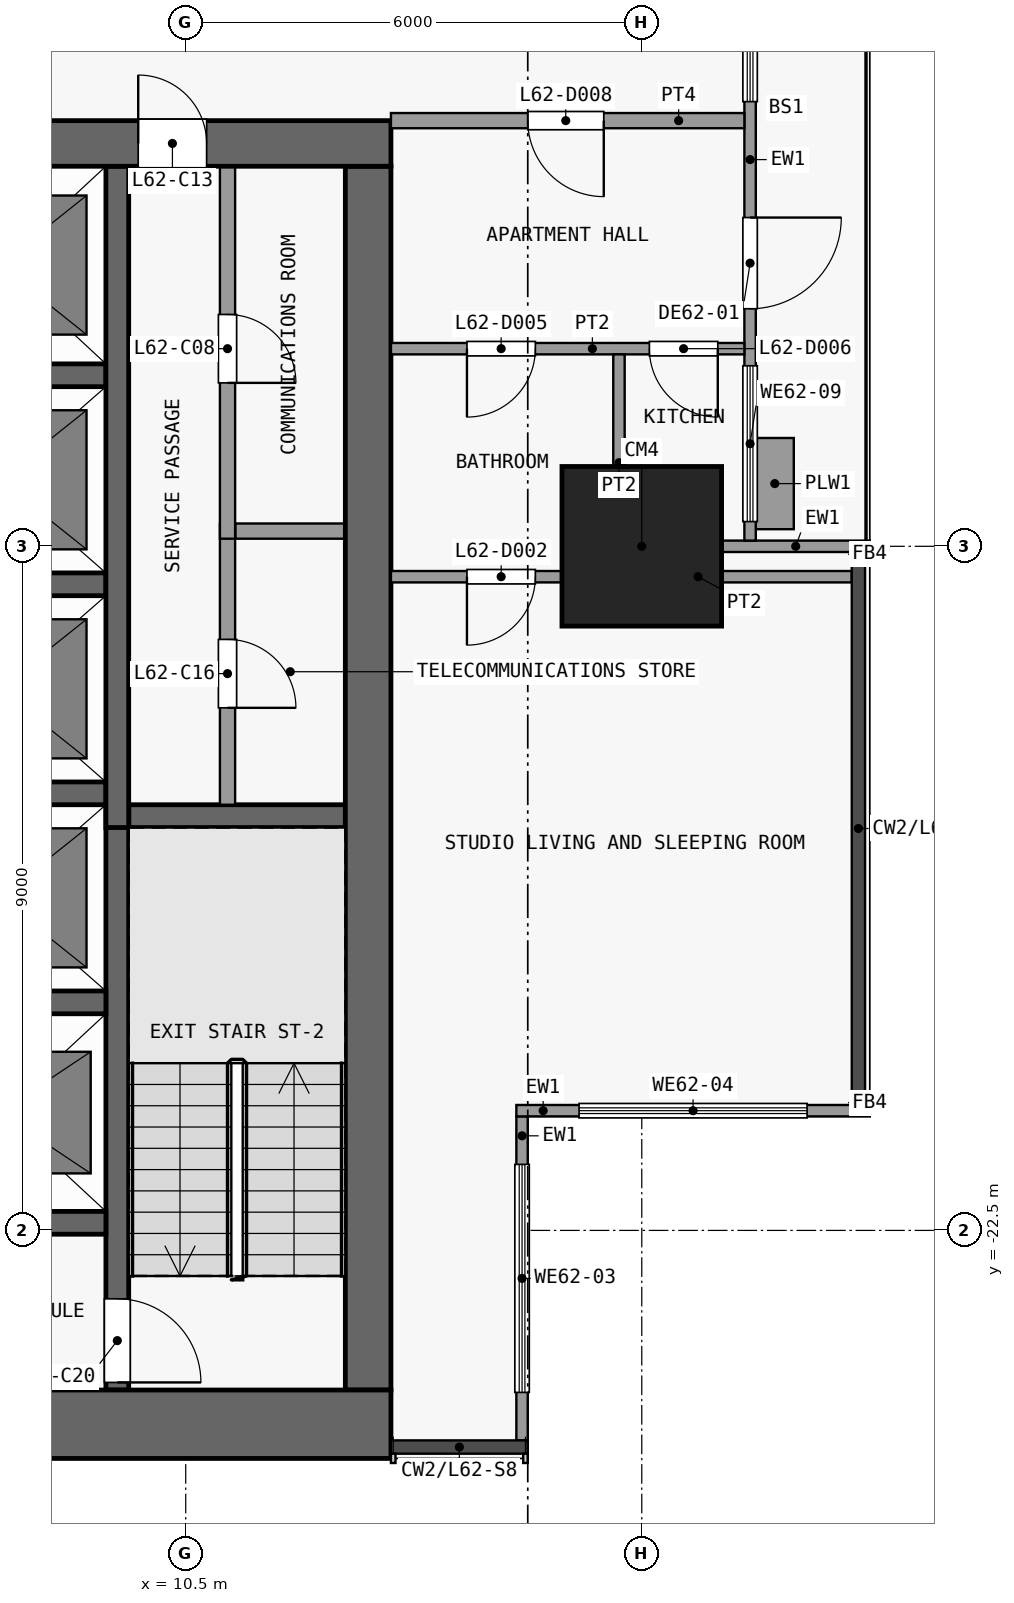
"""IFC4 building model, lengths in metres.
Left out: names, types, materials, properties, quantities, classifications, styles, units other than length and angle.
Written with IfcOpenShell. Run it as: python <this file> out.ifc"""

import sys

from ifc_helpers import new_model, si_unit, direction, frame, frame_2d, origin, origin_2d, place, context, subcontext, project, spatial, rectangle, extrude, element, fill, save


model = new_model("IFC4")
c1 = context("Model", 3, precision=1e-05, world=origin(), true_north=direction((0.0, 1.0)))
c2 = subcontext(c1, "Body", "Model", "MODEL_VIEW")
j1 = project(units=[si_unit("LENGTHUNIT", "METRE"), si_unit("PLANEANGLEUNIT", "RADIAN")], contexts=[c1])
p1 = place(None, origin())
s1 = spatial("IfcSite", under=j1, at=p1, CompositionType="ELEMENT")
p2 = place(p1, origin())
s2 = spatial("IfcBuilding", under=s1, at=p2, CompositionType="ELEMENT")
p3 = place(p2, frame((0.0, 0.0, 244.7)))
s3 = spatial("IfcBuildingStorey", under=s2, at=p3, CompositionType="ELEMENT", Elevation=244.7)
p4 = place(p3, frame((16.5, -13.5, 0.0), z_axis=(0.0, 0.0, 1.0), x_axis=(1.0, 0.0, 0.0)))
e1 = element("IfcColumn", 1, at=p4, inside=s3, PredefinedType="COLUMN", context=c2, shape_type="SweptSolid", body=[
    extrude(rectangle(XDim=2.1, YDim=2.1, at=origin_2d()), origin(), (0.0, 0.0, 1.0), 3.6),
])
p5 = place(p3, frame((-13.2, -25.05, 0.0), z_axis=(0.0, 0.0, 1.0), x_axis=(1.0, 0.0, 0.0)))
e2 = element("IfcWall", 2, at=p5, inside=s3, PredefinedType="SHEAR", context=c2, shape_type="SweptSolid", body=[
    extrude(rectangle(XDim=26.4, YDim=0.9, at=frame_2d((13.2, 0.0))), origin(), (0.0, 0.0, 1.0), 3.15),
])
p6 = place(p3, frame((-13.2, -8.2, 0.0), z_axis=(0.0, 0.0, 1.0), x_axis=(1.0, 0.0, 0.0)))
e3 = element("IfcWall", 3, at=p6, inside=s3, PredefinedType="SHEAR", context=c2, shape_type="SweptSolid", body=[
    extrude(rectangle(XDim=26.4, YDim=0.6, at=frame_2d((13.2, 0.0))), origin(), (0.0, 0.0, 1.0), 3.15),
])
p7 = place(p6, frame((7.5, 0.0, 0.0)))
e4 = element("IfcOpeningElement", 4, at=p7, cuts=e3, PredefinedType="OPENING", context=c2, shape_type="SweptSolid", body=[
    extrude(rectangle(XDim=1.8, YDim=2.1, at=frame_2d((0.9, 1.05))), frame((0.0, 0.31, 0.0), z_axis=(0.0, -1.0, 0.0), x_axis=(1.0, 0.0, 0.0)), (0.0, 0.0, 1.0), 0.62),
])
p8 = place(p6, frame((17.1, 0.0, 0.0)))
e5 = element("IfcOpeningElement", 5, at=p8, cuts=e3, PredefinedType="OPENING", context=c2, shape_type="SweptSolid", body=[
    extrude(rectangle(XDim=1.8, YDim=2.1, at=frame_2d((0.9, 1.05))), frame((0.0, 0.31, 0.0), z_axis=(0.0, -1.0, 0.0), x_axis=(1.0, 0.0, 0.0)), (0.0, 0.0, 1.0), 0.62),
])
p9 = place(p6, frame((2.425, 0.0, 0.0)))
e6 = element("IfcOpeningElement", 6, at=p9, cuts=e3, PredefinedType="OPENING", context=c2, shape_type="SweptSolid", body=[
    extrude(rectangle(XDim=0.9, YDim=2.1, at=frame_2d((0.45, 1.05))), frame((0.0, 0.31, 0.0), z_axis=(0.0, -1.0, 0.0), x_axis=(1.0, 0.0, 0.0)), (0.0, 0.0, 1.0), 0.62),
])
p10 = place(p6, frame((23.075, 0.0, 0.0)))
e7 = element("IfcOpeningElement", 7, at=p10, cuts=e3, PredefinedType="OPENING", context=c2, shape_type="SweptSolid", body=[
    extrude(rectangle(XDim=0.9, YDim=2.1, at=frame_2d((0.45, 1.05))), frame((0.0, 0.31, 0.0), z_axis=(0.0, -1.0, 0.0), x_axis=(1.0, 0.0, 0.0)), (0.0, 0.0, 1.0), 0.62),
])
p11 = place(p3, frame((12.9, -24.6, 0.0), z_axis=(0.0, 0.0, 1.0), x_axis=(0.0, 1.0, 0.0)))
e8 = element("IfcWall", 8, at=p11, inside=s3, PredefinedType="SHEAR", context=c2, shape_type="SweptSolid", body=[
    extrude(rectangle(XDim=16.1, YDim=0.6, at=frame_2d((8.05, 0.0))), origin(), (0.0, 0.0, 1.0), 3.15),
])
for number, where, z_axis, x_axis in (
    (9, (6.65, -22.4, 0.0), (0.0, 0.0, 1.0), (1.0, 0.0, 0.0)),
    (10, (6.65, -19.5, 0.0), (0.0, 0.0, 1.0), (1.0, 0.0, 0.0)),
):
    element("IfcWall", number, at=place(p3, frame(where, z_axis=z_axis, x_axis=x_axis)), inside=s3, PredefinedType="SHEAR", context=c2, shape_type="SweptSolid", body=[
        extrude(rectangle(XDim=2.8, YDim=0.3, at=frame_2d((1.4, 0.0))), origin(), (0.0, 0.0, 1.0), 3.15),
    ])
p12 = place(p3, frame((9.75, -17.05, 0.0), z_axis=(0.0, 0.0, 1.0), x_axis=(1.0, 0.0, 0.0)))
e11 = element("IfcWall", 11, at=p12, inside=s3, PredefinedType="SHEAR", context=c2, shape_type="SweptSolid", body=[
    extrude(rectangle(XDim=2.85, YDim=0.3, at=frame_2d((1.425, 0.0))), origin(), (0.0, 0.0, 1.0), 3.15),
])
for number, where, z_axis, x_axis in (
    (12, (6.65, -16.75, 0.0), (0.0, 0.0, 1.0), (1.0, 0.0, 0.0)),
    (13, (6.65, -14.0, 0.0), (0.0, 0.0, 1.0), (1.0, 0.0, 0.0)),
):
    element("IfcWall", number, at=place(p3, frame(where, z_axis=z_axis, x_axis=x_axis)), inside=s3, PredefinedType="SHEAR", context=c2, shape_type="SweptSolid", body=[
        extrude(rectangle(XDim=2.8, YDim=0.3, at=frame_2d((1.4, 0.0))), origin(), (0.0, 0.0, 1.0), 3.15),
    ])
p13 = place(p3, frame((11.15, -13.3, 0.0), z_axis=(0.0, 0.0, 1.0), x_axis=(1.0, 0.0, 0.0)))
e14 = element("IfcWall", 14, at=p13, inside=s3, PredefinedType="PARTITIONING", context=c2, shape_type="SweptSolid", body=[
    extrude(rectangle(XDim=1.45, YDim=0.2, at=frame_2d((0.725, 0.0))), origin(), (0.0, 0.0, 1.0), 3.15),
])
p14 = place(p3, frame((6.65, -11.25, 0.0), z_axis=(0.0, 0.0, 1.0), x_axis=(1.0, 0.0, 0.0)))
e15 = element("IfcWall", 15, at=p14, inside=s3, PredefinedType="SHEAR", context=c2, shape_type="SweptSolid", body=[
    extrude(rectangle(XDim=2.8, YDim=0.3, at=frame_2d((1.4, 0.0))), origin(), (0.0, 0.0, 1.0), 3.15),
])
p15 = place(p3, frame((9.6, -16.9, 0.0), z_axis=(0.0, 0.0, 1.0), x_axis=(0.0, -1.0, 0.0)))
e16 = element("IfcWall", 16, at=p15, inside=s3, PredefinedType="SHEAR", context=c2, shape_type="SweptSolid", body=[
    extrude(rectangle(XDim=7.7, YDim=0.3, at=frame_2d((3.85, 0.0))), origin(), (0.0, 0.0, 1.0), 3.15),
])
p16 = place(p15, frame((6.5, 0.0, 0.0)))
e17 = element("IfcOpeningElement", 17, at=p16, cuts=e16, PredefinedType="OPENING", context=c2, shape_type="SweptSolid", body=[
    extrude(rectangle(XDim=1.1, YDim=2.1, at=frame_2d((0.55, 1.05))), frame((0.0, 0.16, 0.0), z_axis=(0.0, -1.0, 0.0), x_axis=(1.0, 0.0, 0.0)), (0.0, 0.0, 1.0), 0.32),
])
p17 = place(p3, frame((9.6, -17.2, 0.0), z_axis=(0.0, 0.0, 1.0), x_axis=(0.0, 1.0, 0.0)))
e18 = element("IfcWall", 18, at=p17, inside=s3, PredefinedType="SHEAR", context=c2, shape_type="SweptSolid", body=[
    extrude(rectangle(XDim=8.7, YDim=0.3, at=frame_2d((4.35, 0.0))), origin(), (0.0, 0.0, 1.0), 3.15),
])
p18 = place(p3, frame((11.05, -13.2, 0.0), z_axis=(0.0, 0.0, 1.0), x_axis=(0.0, -1.0, 0.0)))
e19 = element("IfcWall", 19, at=p18, inside=s3, PredefinedType="PARTITIONING", context=c2, shape_type="SweptSolid", body=[
    extrude(rectangle(XDim=3.7, YDim=0.2, at=frame_2d((1.85, 0.0))), origin(), (0.0, 0.0, 1.0), 3.15),
])
p19 = place(p18, frame((1.525, 0.0, 0.0)))
e20 = element("IfcOpeningElement", 20, at=p19, cuts=e19, PredefinedType="OPENING", context=c2, shape_type="SweptSolid", body=[
    extrude(rectangle(XDim=0.9, YDim=2.1, at=frame_2d((0.45, 1.05))), frame((0.0, 0.11, 0.0), z_axis=(0.0, -1.0, 0.0), x_axis=(1.0, 0.0, 0.0)), (0.0, 0.0, 1.0), 0.22),
])
p20 = place(p3, frame((11.05, -8.5, 0.0), z_axis=(0.0, 0.0, 1.0), x_axis=(0.0, -1.0, 0.0)))
e21 = element("IfcWall", 21, at=p20, inside=s3, PredefinedType="PARTITIONING", context=c2, shape_type="SweptSolid", body=[
    extrude(rectangle(XDim=4.9, YDim=0.2, at=frame_2d((2.45, 0.0))), origin(), (0.0, 0.0, 1.0), 3.15),
])
p21 = place(p20, frame((1.95, 0.0, 0.0)))
e22 = element("IfcOpeningElement", 22, at=p21, cuts=e21, PredefinedType="OPENING", context=c2, shape_type="SweptSolid", body=[
    extrude(rectangle(XDim=0.9, YDim=2.1, at=frame_2d((0.45, 1.05))), frame((0.0, 0.11, 0.0), z_axis=(0.0, -1.0, 0.0), x_axis=(1.0, 0.0, 0.0)), (0.0, 0.0, 1.0), 0.22),
])
p22 = place(p3, frame((14.925, -21.0, 0.0), z_axis=(0.0, 0.0, 1.0), x_axis=(0.0, -1.0, 0.0)))
e23 = element("IfcWall", 23, at=p22, inside=s3, PredefinedType="SOLIDWALL", context=c2, shape_type="SweptSolid", body=[
    extrude(rectangle(XDim=4.262, YDim=0.15, at=frame_2d((2.131, 0.0))), origin(), (0.0, 0.0, 1.0), 3.15),
])
p23 = place(p22, frame((0.631, 0.0, 0.9)))
e24 = element("IfcOpeningElement", 24, at=p23, cuts=e23, PredefinedType="OPENING", context=c2, shape_type="SweptSolid", body=[
    extrude(rectangle(XDim=3.0, YDim=2.4, at=frame_2d((1.5, 1.2))), frame((0.0, 0.085, 0.0), z_axis=(0.0, -1.0, 0.0), x_axis=(1.0, 0.0, 0.0)), (0.0, 0.0, 1.0), 0.17),
])
p24 = place(p3, frame((19.5, -20.925, 0.0), z_axis=(0.0, 0.0, 1.0), x_axis=(-1.0, 0.0, 0.0)))
e25 = element("IfcWall", 25, at=p24, inside=s3, PredefinedType="SOLIDWALL", context=c2, shape_type="SweptSolid", body=[
    extrude(rectangle(XDim=4.65, YDim=0.15, at=frame_2d((2.325, 0.0))), origin(), (0.0, 0.0, 1.0), 3.15),
])
p25 = place(p24, frame((0.825, 0.0, 0.9)))
e26 = element("IfcOpeningElement", 26, at=p25, cuts=e25, PredefinedType="OPENING", context=c2, shape_type="SweptSolid", body=[
    extrude(rectangle(XDim=3.0, YDim=2.4, at=frame_2d((1.5, 1.2))), frame((0.0, 0.085, 0.0), z_axis=(0.0, -1.0, 0.0), x_axis=(1.0, 0.0, 0.0)), (0.0, 0.0, 1.0), 0.17),
])
p26 = place(p3, frame((17.55, -13.5, 0.0), z_axis=(0.0, 0.0, 1.0), x_axis=(1.0, 0.0, 0.0)))
e27 = element("IfcWall", 27, at=p26, inside=s3, PredefinedType="SOLIDWALL", context=c2, shape_type="SweptSolid", body=[
    extrude(rectangle(XDim=1.95, YDim=0.15, at=frame_2d((0.975, 0.0))), origin(), (0.0, 0.0, 1.0), 3.15),
])
p27 = place(p3, frame((17.925, -4.575, 0.0), z_axis=(0.0, 0.0, 1.0), x_axis=(0.0, -1.0, 0.0)))
e28 = element("IfcWall", 28, at=p27, inside=s3, PredefinedType="SOLIDWALL", context=c2, shape_type="SweptSolid", body=[
    extrude(rectangle(XDim=8.85, YDim=0.15, at=frame_2d((4.425, 0.0))), origin(), (0.0, 0.0, 1.0), 3.15),
])
p28 = place(p27, frame((4.6, 0.0, 0.0)))
e29 = element("IfcOpeningElement", 29, at=p28, cuts=e28, PredefinedType="OPENING", context=c2, shape_type="SweptSolid", body=[
    extrude(rectangle(XDim=1.2, YDim=2.4, at=frame_2d((0.6, 1.2))), frame((0.0, 0.085, 0.0), z_axis=(0.0, -1.0, 0.0), x_axis=(1.0, 0.0, 0.0)), (0.0, 0.0, 1.0), 0.17),
])
p29 = place(p27, frame((6.55, 0.0, 0.9)))
e30 = element("IfcOpeningElement", 30, at=p29, cuts=e28, PredefinedType="OPENING", context=c2, shape_type="SweptSolid", body=[
    extrude(rectangle(XDim=2.05, YDim=2.1, at=frame_2d((1.025, 1.05))), frame((0.0, 0.085, 0.0), z_axis=(0.0, -1.0, 0.0), x_axis=(1.0, 0.0, 0.0)), (0.0, 0.0, 1.0), 0.17),
])
p30 = place(p27, frame((0.8, 0.0, 0.9)))
e31 = element("IfcOpeningElement", 31, at=p30, cuts=e28, PredefinedType="OPENING", context=c2, shape_type="SweptSolid", body=[
    extrude(rectangle(XDim=2.275, YDim=2.1, at=frame_2d((1.137, 1.05))), frame((0.0, 0.085, 0.0), z_axis=(0.0, -1.0, 0.0), x_axis=(1.0, 0.0, 0.0)), (0.0, 0.0, 1.0), 0.17),
])
p31 = place(p3, frame((18.25, -13.275, 0.0), z_axis=(0.0, 0.0, 1.0), x_axis=(0.0, 1.0, 0.0)))
e32 = element("IfcWall", 32, at=p31, inside=s3, PredefinedType="USERDEFINED", context=c2, shape_type="SweptSolid", body=[
    extrude(rectangle(XDim=1.2, YDim=0.5, at=frame_2d((0.6, 0.0))), origin(), (0.0, 0.0, 1.0), 0.9),
])
p32 = place(p3, frame((13.2, -13.9, 0.0), z_axis=(0.0, 0.0, 1.0), x_axis=(1.0, 0.0, 0.0)))
e33 = element("IfcWall", 33, at=p32, inside=s3, PredefinedType="PARTITIONING", context=c2, shape_type="SweptSolid", body=[
    extrude(rectangle(XDim=6.062, YDim=0.15, at=frame_2d((3.031, 0.0))), origin(), (0.0, 0.0, 1.0), 3.15),
])
p33 = place(p32, frame((1.0, 0.0, 0.0)))
e34 = element("IfcOpeningElement", 34, at=p33, cuts=e33, PredefinedType="OPENING", context=c2, shape_type="SweptSolid", body=[
    extrude(rectangle(XDim=0.9, YDim=2.1, at=frame_2d((0.45, 1.05))), frame((0.0, 0.085, 0.0), z_axis=(0.0, -1.0, 0.0), x_axis=(1.0, 0.0, 0.0)), (0.0, 0.0, 1.0), 0.17),
])
p34 = place(p3, frame((13.2, -10.9, 0.0), z_axis=(0.0, 0.0, 1.0), x_axis=(1.0, 0.0, 0.0)))
e35 = element("IfcWall", 35, at=p34, inside=s3, PredefinedType="PARTITIONING", context=c2, shape_type="SweptSolid", body=[
    extrude(rectangle(XDim=4.65, YDim=0.15, at=frame_2d((2.325, 0.0))), origin(), (0.0, 0.0, 1.0), 3.15),
])
p35 = place(p34, frame((1.0, 0.0, 0.0)))
e36 = element("IfcOpeningElement", 36, at=p35, cuts=e35, PredefinedType="OPENING", context=c2, shape_type="SweptSolid", body=[
    extrude(rectangle(XDim=0.9, YDim=2.1, at=frame_2d((0.45, 1.05))), frame((0.0, 0.085, 0.0), z_axis=(0.0, -1.0, 0.0), x_axis=(1.0, 0.0, 0.0)), (0.0, 0.0, 1.0), 0.17),
])
p36 = place(p34, frame((3.4, 0.0, 0.0)))
e37 = element("IfcOpeningElement", 37, at=p36, cuts=e35, PredefinedType="OPENING", context=c2, shape_type="SweptSolid", body=[
    extrude(rectangle(XDim=0.9, YDim=2.1, at=frame_2d((0.45, 1.05))), frame((0.0, 0.085, 0.0), z_axis=(0.0, -1.0, 0.0), x_axis=(1.0, 0.0, 0.0)), (0.0, 0.0, 1.0), 0.17),
])
p37 = place(p3, frame((13.2, -7.9, 0.0), z_axis=(0.0, 0.0, 1.0), x_axis=(1.0, 0.0, 0.0)))
e38 = element("IfcWall", 38, at=p37, inside=s3, PredefinedType="PARTITIONING", context=c2, shape_type="SweptSolid", body=[
    extrude(rectangle(XDim=4.65, YDim=0.2, at=frame_2d((2.325, 0.0))), origin(), (0.0, 0.0, 1.0), 3.15),
])
p38 = place(p37, frame((1.8, 0.0, 0.0)))
e39 = element("IfcOpeningElement", 39, at=p38, cuts=e38, PredefinedType="OPENING", context=c2, shape_type="SweptSolid", body=[
    extrude(rectangle(XDim=1.0, YDim=2.1, at=frame_2d((0.5, 1.05))), frame((0.0, 0.11, 0.0), z_axis=(0.0, -1.0, 0.0), x_axis=(1.0, 0.0, 0.0)), (0.0, 0.0, 1.0), 0.22),
])
p39 = place(p3, frame((16.2, -13.825, 0.0), z_axis=(0.0, 0.0, 1.0), x_axis=(0.0, 1.0, 0.0)))
e40 = element("IfcWall", 40, at=p39, inside=s3, PredefinedType="PARTITIONING", context=c2, shape_type="SweptSolid", body=[
    extrude(rectangle(XDim=2.85, YDim=0.15, at=frame_2d((1.425, 0.0))), origin(), (0.0, 0.0, 1.0), 3.15),
])
p40 = place(p21, origin())
e41 = element("IfcDoor", 41, at=p40, inside=s3, OperationType="SINGLE_SWING_RIGHT", PredefinedType="DOOR", context=c2, shape_type="SweptSolid", body=[
    extrude(rectangle(XDim=0.9, YDim=2.1, at=frame_2d((0.45, 1.05))), frame((0.0, 0.025, 0.0), z_axis=(0.0, -1.0, 0.0), x_axis=(1.0, 0.0, 0.0)), (0.0, 0.0, 1.0), 0.05),
])
fill(e22, e41)
p41 = place(p10, origin())
e42 = element("IfcDoor", 42, at=p41, inside=s3, OperationType="SINGLE_SWING_LEFT", PredefinedType="DOOR", context=c2, shape_type="SweptSolid", body=[
    extrude(rectangle(XDim=0.9, YDim=2.1, at=frame_2d((0.45, 1.05))), frame((0.0, 0.025, 0.0), z_axis=(0.0, -1.0, 0.0), x_axis=(1.0, 0.0, 0.0)), (0.0, 0.0, 1.0), 0.05),
])
fill(e7, e42)
p42 = place(p19, origin())
e43 = element("IfcDoor", 43, at=p42, inside=s3, OperationType="SINGLE_SWING_RIGHT", PredefinedType="DOOR", context=c2, shape_type="SweptSolid", body=[
    extrude(rectangle(XDim=0.9, YDim=2.1, at=frame_2d((0.45, 1.05))), frame((0.0, 0.025, 0.0), z_axis=(0.0, -1.0, 0.0), x_axis=(1.0, 0.0, 0.0)), (0.0, 0.0, 1.0), 0.05),
])
fill(e20, e43)
p43 = place(p16, origin())
e44 = element("IfcDoor", 44, at=p43, inside=s3, OperationType="SINGLE_SWING_RIGHT", PredefinedType="DOOR", context=c2, shape_type="SweptSolid", body=[
    extrude(rectangle(XDim=1.1, YDim=2.1, at=frame_2d((0.55, 1.05))), frame((0.0, 0.025, 0.0), z_axis=(0.0, -1.0, 0.0), x_axis=(1.0, 0.0, 0.0)), (0.0, 0.0, 1.0), 0.05),
])
fill(e17, e44)
p44 = place(p23, origin())
e45 = element("IfcWindow", 45, at=p44, inside=s3, PartitioningType="SINGLE_PANEL", PredefinedType="WINDOW", context=c2, shape_type="SweptSolid", body=[
    extrude(rectangle(XDim=3.0, YDim=2.4, at=frame_2d((1.5, 1.2))), frame((0.0, 0.03, 0.0), z_axis=(0.0, -1.0, 0.0), x_axis=(1.0, 0.0, 0.0)), (0.0, 0.0, 1.0), 0.06),
])
fill(e24, e45)
p45 = place(p25, origin())
e46 = element("IfcWindow", 46, at=p45, inside=s3, PartitioningType="SINGLE_PANEL", PredefinedType="WINDOW", context=c2, shape_type="SweptSolid", body=[
    extrude(rectangle(XDim=3.0, YDim=2.4, at=frame_2d((1.5, 1.2))), frame((0.0, 0.03, 0.0), z_axis=(0.0, -1.0, 0.0), x_axis=(1.0, 0.0, 0.0)), (0.0, 0.0, 1.0), 0.06),
])
fill(e26, e46)
p46 = place(p28, origin())
e47 = element("IfcDoor", 47, at=p46, inside=s3, OperationType="SINGLE_SWING_LEFT", PredefinedType="DOOR", context=c2, shape_type="SweptSolid", body=[
    extrude(rectangle(XDim=1.2, YDim=2.4, at=frame_2d((0.6, 1.2))), frame((0.0, 0.025, 0.0), z_axis=(0.0, -1.0, 0.0), x_axis=(1.0, 0.0, 0.0)), (0.0, 0.0, 1.0), 0.05),
])
fill(e29, e47)
p47 = place(p29, origin())
e48 = element("IfcWindow", 48, at=p47, inside=s3, PartitioningType="SINGLE_PANEL", PredefinedType="WINDOW", context=c2, shape_type="SweptSolid", body=[
    extrude(rectangle(XDim=2.05, YDim=2.1, at=frame_2d((1.025, 1.05))), frame((0.0, 0.03, 0.0), z_axis=(0.0, -1.0, 0.0), x_axis=(1.0, 0.0, 0.0)), (0.0, 0.0, 1.0), 0.06),
])
fill(e30, e48)
p48 = place(p30, origin())
e49 = element("IfcWindow", 49, at=p48, inside=s3, PartitioningType="SINGLE_PANEL", PredefinedType="WINDOW", context=c2, shape_type="SweptSolid", body=[
    extrude(rectangle(XDim=2.275, YDim=2.1, at=frame_2d((1.137, 1.05))), frame((0.0, 0.03, 0.0), z_axis=(0.0, -1.0, 0.0), x_axis=(1.0, 0.0, 0.0)), (0.0, 0.0, 1.0), 0.06),
])
fill(e31, e49)
p49 = place(p33, origin())
e50 = element("IfcDoor", 50, at=p49, inside=s3, OperationType="SINGLE_SWING_LEFT", PredefinedType="DOOR", context=c2, shape_type="SweptSolid", body=[
    extrude(rectangle(XDim=0.9, YDim=2.1, at=frame_2d((0.45, 1.05))), frame((0.0, 0.025, 0.0), z_axis=(0.0, -1.0, 0.0), x_axis=(1.0, 0.0, 0.0)), (0.0, 0.0, 1.0), 0.05),
])
fill(e34, e50)
p50 = place(p35, origin())
e51 = element("IfcDoor", 51, at=p50, inside=s3, OperationType="SINGLE_SWING_LEFT", PredefinedType="DOOR", context=c2, shape_type="SweptSolid", body=[
    extrude(rectangle(XDim=0.9, YDim=2.1, at=frame_2d((0.45, 1.05))), frame((0.0, 0.025, 0.0), z_axis=(0.0, -1.0, 0.0), x_axis=(1.0, 0.0, 0.0)), (0.0, 0.0, 1.0), 0.05),
])
fill(e36, e51)
p51 = place(p36, origin())
e52 = element("IfcDoor", 52, at=p51, inside=s3, OperationType="SINGLE_SWING_RIGHT", PredefinedType="DOOR", context=c2, shape_type="SweptSolid", body=[
    extrude(rectangle(XDim=0.9, YDim=2.1, at=frame_2d((0.45, 1.05))), frame((0.0, 0.025, 0.0), z_axis=(0.0, -1.0, 0.0), x_axis=(1.0, 0.0, 0.0)), (0.0, 0.0, 1.0), 0.05),
])
fill(e37, e52)
p52 = place(p38, origin())
e53 = element("IfcDoor", 53, at=p52, inside=s3, OperationType="SINGLE_SWING_RIGHT", PredefinedType="DOOR", context=c2, shape_type="SweptSolid", body=[
    extrude(rectangle(XDim=1.0, YDim=2.1, at=frame_2d((0.5, 1.05))), frame((0.0, 0.025, 0.0), z_axis=(0.0, -1.0, 0.0), x_axis=(1.0, 0.0, 0.0)), (0.0, 0.0, 1.0), 0.05),
])
fill(e39, e53)
save(model, sys.argv[1])
